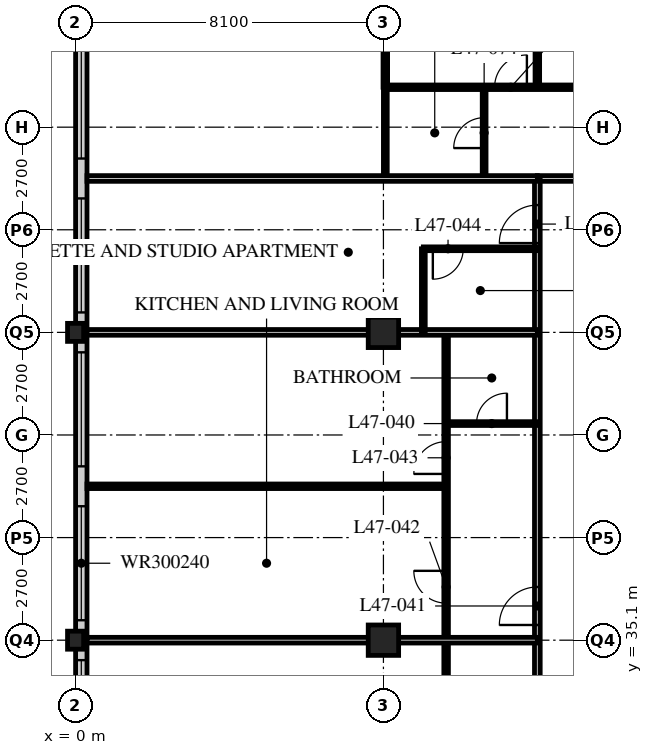
"""IFC4 building model, lengths in metres.
Left out: names, types, materials, properties, quantities, classifications, styles, units other than length and angle.
Written with IfcOpenShell. Run it as: python <this file> out.ifc"""

import sys

from ifc_helpers import new_model, si_unit, direction, frame, frame_2d, origin, origin_2d, place, context, subcontext, project, spatial, rectangle, hollow_rectangle, i_section, extrude, element, fill, save


model = new_model("IFC4")
c1 = context("Model", 3, precision=1e-05, world=origin(), true_north=direction((0.0, 1.0)))
c2 = subcontext(c1, "Body", "Model", "MODEL_VIEW")
j1 = project(units=[si_unit("LENGTHUNIT", "METRE"), si_unit("PLANEANGLEUNIT", "RADIAN")], contexts=[c1])
p1 = place(None, origin())
s1 = spatial("IfcSite", under=j1, at=p1, CompositionType="ELEMENT")
p2 = place(p1, origin())
s2 = spatial("IfcBuilding", under=s1, at=p2, CompositionType="ELEMENT")
p3 = place(p2, frame((0.0, 0.0, 184.8)))
s3 = spatial("IfcBuildingStorey", under=s2, at=p3, CompositionType="ELEMENT", Elevation=184.8)
for number, where, z_axis, x_axis in (
    (1, (0.0, 35.1, 0.0), (0.0, 0.0, 1.0), (1.0, 0.0, 0.0)),
    (2, (0.0, 43.2, 0.0), (0.0, 0.0, 1.0), (1.0, 0.0, 0.0)),
):
    element("IfcColumn", number, at=place(p3, frame(where, z_axis=z_axis, x_axis=x_axis)), inside=s3, PredefinedType="COLUMN", context=c2, shape_type="SweptSolid", body=[
        extrude(i_section(OverallWidth=0.424, OverallDepth=0.475, WebThickness=0.048, FlangeThickness=0.077, FilletRadius=0.015, at=origin_2d()), origin(), (0.0, 0.0, 1.0), 3.6),
    ])
for number, where, z_axis, x_axis in (
    (3, (8.1, 35.1, 0.0), (0.0, 0.0, 1.0), (1.0, 0.0, 0.0)),
    (4, (8.1, 43.2, 0.0), (0.0, 0.0, 1.0), (1.0, 0.0, 0.0)),
):
    element("IfcColumn", number, at=place(p3, frame(where, z_axis=z_axis, x_axis=x_axis)), inside=s3, PredefinedType="COLUMN", context=c2, shape_type="SweptSolid", body=[
        extrude(hollow_rectangle(XDim=0.8, YDim=0.8, WallThickness=0.08, at=origin_2d()), origin(), (0.0, 0.0, 1.0), 3.6),
    ])
p4 = place(p3, frame((0.15, 51.0, 0.0), z_axis=(0.0, 0.0, 1.0), x_axis=(0.0, -1.0, 0.0)))
e5 = element("IfcWall", 5, at=p4, inside=s3, PredefinedType="SOLIDWALL", context=c2, shape_type="SweptSolid", body=[
    extrude(rectangle(XDim=32.1, YDim=0.3, at=frame_2d((16.05, 0.0))), origin(), (0.0, 0.0, 1.0), 3.39),
])
p5 = place(p4, frame((0.225, 0.0, 0.6)))
e6 = element("IfcOpeningElement", 6, at=p5, cuts=e5, PredefinedType="OPENING", context=c2, shape_type="SweptSolid", body=[
    extrude(rectangle(XDim=3.0, YDim=2.4, at=frame_2d((1.5, 1.2))), frame((0.0, 0.16, 0.0), z_axis=(0.0, -1.0, 0.0), x_axis=(1.0, 0.0, 0.0)), (0.0, 0.0, 1.0), 0.32),
])
p6 = place(p4, frame((4.275, 0.0, 0.6)))
e7 = element("IfcOpeningElement", 7, at=p6, cuts=e5, PredefinedType="OPENING", context=c2, shape_type="SweptSolid", body=[
    extrude(rectangle(XDim=3.0, YDim=2.4, at=frame_2d((1.5, 1.2))), frame((0.0, 0.16, 0.0), z_axis=(0.0, -1.0, 0.0), x_axis=(1.0, 0.0, 0.0)), (0.0, 0.0, 1.0), 0.32),
])
p7 = place(p4, frame((8.325, 0.0, 0.6)))
e8 = element("IfcOpeningElement", 8, at=p7, cuts=e5, PredefinedType="OPENING", context=c2, shape_type="SweptSolid", body=[
    extrude(rectangle(XDim=3.0, YDim=2.4, at=frame_2d((1.5, 1.2))), frame((0.0, 0.16, 0.0), z_axis=(0.0, -1.0, 0.0), x_axis=(1.0, 0.0, 0.0)), (0.0, 0.0, 1.0), 0.32),
])
p8 = place(p4, frame((12.375, 0.0, 0.6)))
e9 = element("IfcOpeningElement", 9, at=p8, cuts=e5, PredefinedType="OPENING", context=c2, shape_type="SweptSolid", body=[
    extrude(rectangle(XDim=3.0, YDim=2.4, at=frame_2d((1.5, 1.2))), frame((0.0, 0.16, 0.0), z_axis=(0.0, -1.0, 0.0), x_axis=(1.0, 0.0, 0.0)), (0.0, 0.0, 1.0), 0.32),
])
p9 = place(p4, frame((16.425, 0.0, 0.6)))
e10 = element("IfcOpeningElement", 10, at=p9, cuts=e5, PredefinedType="OPENING", context=c2, shape_type="SweptSolid", body=[
    extrude(rectangle(XDim=3.0, YDim=2.4, at=frame_2d((1.5, 1.2))), frame((0.0, 0.16, 0.0), z_axis=(0.0, -1.0, 0.0), x_axis=(1.0, 0.0, 0.0)), (0.0, 0.0, 1.0), 0.32),
])
p10 = place(p4, frame((20.475, 0.0, 0.6)))
e11 = element("IfcOpeningElement", 11, at=p10, cuts=e5, PredefinedType="OPENING", context=c2, shape_type="SweptSolid", body=[
    extrude(rectangle(XDim=3.0, YDim=2.4, at=frame_2d((1.5, 1.2))), frame((0.0, 0.16, 0.0), z_axis=(0.0, -1.0, 0.0), x_axis=(1.0, 0.0, 0.0)), (0.0, 0.0, 1.0), 0.32),
])
p11 = place(p4, frame((24.525, 0.0, 0.6)))
e12 = element("IfcOpeningElement", 12, at=p11, cuts=e5, PredefinedType="OPENING", context=c2, shape_type="SweptSolid", body=[
    extrude(rectangle(XDim=3.0, YDim=2.4, at=frame_2d((1.5, 1.2))), frame((0.0, 0.16, 0.0), z_axis=(0.0, -1.0, 0.0), x_axis=(1.0, 0.0, 0.0)), (0.0, 0.0, 1.0), 0.32),
])
p12 = place(p4, frame((28.575, 0.0, 0.6)))
e13 = element("IfcOpeningElement", 13, at=p12, cuts=e5, PredefinedType="OPENING", context=c2, shape_type="SweptSolid", body=[
    extrude(rectangle(XDim=3.0, YDim=2.4, at=frame_2d((1.5, 1.2))), frame((0.0, 0.16, 0.0), z_axis=(0.0, -1.0, 0.0), x_axis=(1.0, 0.0, 0.0)), (0.0, 0.0, 1.0), 0.32),
])
p13 = place(p3, frame((12.15, 47.25, 0.0), z_axis=(0.0, 0.0, 1.0), x_axis=(1.0, 0.0, 0.0)))
e14 = element("IfcWall", 14, at=p13, inside=s3, PredefinedType="PARTITIONING", context=c2, shape_type="SweptSolid", body=[
    extrude(rectangle(XDim=32.4, YDim=0.15, at=frame_2d((16.2, 0.0))), origin(), (0.0, 0.0, 1.0), 3.39),
])
p14 = place(p13, frame((4.45, 0.0, 0.0)))
e15 = element("IfcOpeningElement", 15, at=p14, cuts=e14, PredefinedType="OPENING", context=c2, shape_type="SweptSolid", body=[
    extrude(rectangle(XDim=1.0, YDim=2.1, at=frame_2d((0.5, 1.05))), frame((0.0, 0.085, 0.0), z_axis=(0.0, -1.0, 0.0), x_axis=(1.0, 0.0, 0.0)), (0.0, 0.0, 1.0), 0.17),
])
p15 = place(p13, frame((16.6, 0.0, 0.0)))
e16 = element("IfcOpeningElement", 16, at=p15, cuts=e14, PredefinedType="OPENING", context=c2, shape_type="SweptSolid", body=[
    extrude(rectangle(XDim=1.0, YDim=2.1, at=frame_2d((0.5, 1.05))), frame((0.0, 0.085, 0.0), z_axis=(0.0, -1.0, 0.0), x_axis=(1.0, 0.0, 0.0)), (0.0, 0.0, 1.0), 0.17),
])
p16 = place(p13, frame((29.875, 0.0, 0.0)))
e17 = element("IfcOpeningElement", 17, at=p16, cuts=e14, PredefinedType="OPENING", context=c2, shape_type="SweptSolid", body=[
    extrude(rectangle(XDim=1.0, YDim=2.1, at=frame_2d((0.5, 1.05))), frame((0.0, 0.085, 0.0), z_axis=(0.0, -1.0, 0.0), x_axis=(1.0, 0.0, 0.0)), (0.0, 0.0, 1.0), 0.17),
])
p17 = place(p13, frame((1.525, 0.0, 0.0)))
e18 = element("IfcOpeningElement", 18, at=p17, cuts=e14, PredefinedType="OPENING", context=c2, shape_type="SweptSolid", body=[
    extrude(rectangle(XDim=1.0, YDim=2.1, at=frame_2d((0.5, 1.05))), frame((0.0, 0.085, 0.0), z_axis=(0.0, -1.0, 0.0), x_axis=(1.0, 0.0, 0.0)), (0.0, 0.0, 1.0), 0.17),
])
p18 = place(p3, frame((12.15, 18.9, 0.0), z_axis=(0.0, 0.0, 1.0), x_axis=(0.0, 1.0, 0.0)))
e19 = element("IfcWall", 19, at=p18, inside=s3, PredefinedType="PARTITIONING", context=c2, shape_type="SweptSolid", body=[
    extrude(rectangle(XDim=28.35, YDim=0.15, at=frame_2d((14.175, 0.0))), origin(), (0.0, 0.0, 1.0), 3.39),
])
p19 = place(p18, frame((2.35, 0.0, 0.0)))
e20 = element("IfcOpeningElement", 20, at=p19, cuts=e19, PredefinedType="OPENING", context=c2, shape_type="SweptSolid", body=[
    extrude(rectangle(XDim=1.0, YDim=2.1, at=frame_2d((0.5, 1.05))), frame((0.0, 0.085, 0.0), z_axis=(0.0, -1.0, 0.0), x_axis=(1.0, 0.0, 0.0)), (0.0, 0.0, 1.0), 0.17),
])
p20 = place(p18, frame((6.4, 0.0, 0.0)))
e21 = element("IfcOpeningElement", 21, at=p20, cuts=e19, PredefinedType="OPENING", context=c2, shape_type="SweptSolid", body=[
    extrude(rectangle(XDim=1.0, YDim=2.1, at=frame_2d((0.5, 1.05))), frame((0.0, 0.085, 0.0), z_axis=(0.0, -1.0, 0.0), x_axis=(1.0, 0.0, 0.0)), (0.0, 0.0, 1.0), 0.17),
])
p21 = place(p18, frame((8.5, 0.0, 0.0)))
e22 = element("IfcOpeningElement", 22, at=p21, cuts=e19, PredefinedType="OPENING", context=c2, shape_type="SweptSolid", body=[
    extrude(rectangle(XDim=1.0, YDim=2.1, at=frame_2d((0.5, 1.05))), frame((0.0, 0.085, 0.0), z_axis=(0.0, -1.0, 0.0), x_axis=(1.0, 0.0, 0.0)), (0.0, 0.0, 1.0), 0.17),
])
p22 = place(p18, frame((16.6, 0.0, 0.0)))
e23 = element("IfcOpeningElement", 23, at=p22, cuts=e19, PredefinedType="OPENING", context=c2, shape_type="SweptSolid", body=[
    extrude(rectangle(XDim=1.0, YDim=2.1, at=frame_2d((0.5, 1.05))), frame((0.0, 0.085, 0.0), z_axis=(0.0, -1.0, 0.0), x_axis=(1.0, 0.0, 0.0)), (0.0, 0.0, 1.0), 0.17),
])
p23 = place(p18, frame((26.65, 0.0, 0.0)))
e24 = element("IfcOpeningElement", 24, at=p23, cuts=e19, PredefinedType="OPENING", context=c2, shape_type="SweptSolid", body=[
    extrude(rectangle(XDim=1.0, YDim=2.1, at=frame_2d((0.5, 1.05))), frame((0.0, 0.085, 0.0), z_axis=(0.0, -1.0, 0.0), x_axis=(1.0, 0.0, 0.0)), (0.0, 0.0, 1.0), 0.17),
])
p24 = place(p3, frame((9.75, 27.0, 0.0), z_axis=(0.0, 0.0, 1.0), x_axis=(0.0, 1.0, 0.0)))
e25 = element("IfcWall", 25, at=p24, inside=s3, PredefinedType="PARTITIONING", context=c2, shape_type="SweptSolid", body=[
    extrude(rectangle(XDim=16.2, YDim=0.12, at=frame_2d((8.1, 0.0))), origin(), (0.0, 0.0, 1.0), 3.39),
])
p25 = place(p24, frame((0.975, 0.0, 0.0)))
e26 = element("IfcOpeningElement", 26, at=p25, cuts=e25, PredefinedType="OPENING", context=c2, shape_type="SweptSolid", body=[
    extrude(rectangle(XDim=0.85, YDim=2.1, at=frame_2d((0.425, 1.05))), frame((0.0, 0.07, 0.0), z_axis=(0.0, -1.0, 0.0), x_axis=(1.0, 0.0, 0.0)), (0.0, 0.0, 1.0), 0.14),
])
p26 = place(p24, frame((4.375, 0.0, 0.0)))
e27 = element("IfcOpeningElement", 27, at=p26, cuts=e25, PredefinedType="OPENING", context=c2, shape_type="SweptSolid", body=[
    extrude(rectangle(XDim=0.85, YDim=2.1, at=frame_2d((0.425, 1.05))), frame((0.0, 0.07, 0.0), z_axis=(0.0, -1.0, 0.0), x_axis=(1.0, 0.0, 0.0)), (0.0, 0.0, 1.0), 0.14),
])
p27 = place(p24, frame((9.075, 0.0, 0.0)))
e28 = element("IfcOpeningElement", 28, at=p27, cuts=e25, PredefinedType="OPENING", context=c2, shape_type="SweptSolid", body=[
    extrude(rectangle(XDim=0.85, YDim=2.1, at=frame_2d((0.425, 1.05))), frame((0.0, 0.07, 0.0), z_axis=(0.0, -1.0, 0.0), x_axis=(1.0, 0.0, 0.0)), (0.0, 0.0, 1.0), 0.14),
])
p28 = place(p24, frame((12.475, 0.0, 0.0)))
e29 = element("IfcOpeningElement", 29, at=p28, cuts=e25, PredefinedType="OPENING", context=c2, shape_type="SweptSolid", body=[
    extrude(rectangle(XDim=0.85, YDim=2.1, at=frame_2d((0.425, 1.05))), frame((0.0, 0.07, 0.0), z_axis=(0.0, -1.0, 0.0), x_axis=(1.0, 0.0, 0.0)), (0.0, 0.0, 1.0), 0.14),
])
p29 = place(p3, frame((12.15, 35.1, 0.0), z_axis=(0.0, 0.0, 1.0), x_axis=(-1.0, 0.0, 0.0)))
e30 = element("IfcWall", 30, at=p29, inside=s3, PredefinedType="PARTITIONING", context=c2, shape_type="SweptSolid", body=[
    extrude(rectangle(XDim=11.85, YDim=0.15, at=frame_2d((5.925, 0.0))), origin(), (0.0, 0.0, 1.0), 2.778),
])
p30 = place(p3, frame((12.15, 40.8, 0.0), z_axis=(0.0, 0.0, 1.0), x_axis=(-1.0, 0.0, 0.0)))
e31 = element("IfcWall", 31, at=p30, inside=s3, PredefinedType="PARTITIONING", context=c2, shape_type="SweptSolid", body=[
    extrude(rectangle(XDim=2.4, YDim=0.1, at=frame_2d((1.2, 0.0))), origin(), (0.0, 0.0, 1.0), 3.39),
])
p31 = place(p30, frame((0.8, 0.0, 0.0)))
e32 = element("IfcOpeningElement", 32, at=p31, cuts=e31, PredefinedType="OPENING", context=c2, shape_type="SweptSolid", body=[
    extrude(rectangle(XDim=0.8, YDim=2.1, at=frame_2d((0.4, 1.05))), frame((0.0, 0.06, 0.0), z_axis=(0.0, -1.0, 0.0), x_axis=(1.0, 0.0, 0.0)), (0.0, 0.0, 1.0), 0.12),
])
p32 = place(p3, frame((9.75, 39.15, 0.0), z_axis=(0.0, 0.0, 1.0), x_axis=(-1.0, 0.0, 0.0)))
e33 = element("IfcWall", 33, at=p32, inside=s3, PredefinedType="PARTITIONING", context=c2, shape_type="SweptSolid", body=[
    extrude(rectangle(XDim=9.45, YDim=0.12, at=frame_2d((4.725, 0.0))), origin(), (0.0, 0.0, 1.0), 3.39),
])
p33 = place(p3, frame((12.15, 43.2, 0.0), z_axis=(0.0, 0.0, 1.0), x_axis=(-1.0, 0.0, 0.0)))
e34 = element("IfcWall", 34, at=p33, inside=s3, PredefinedType="PARTITIONING", context=c2, shape_type="SweptSolid", body=[
    extrude(rectangle(XDim=11.85, YDim=0.15, at=frame_2d((5.925, 0.0))), origin(), (0.0, 0.0, 1.0), 2.778),
])
p34 = place(p3, frame((9.15, 43.2, 0.0), z_axis=(0.0, 0.0, 1.0), x_axis=(0.0, 1.0, 0.0)))
e35 = element("IfcWall", 35, at=p34, inside=s3, PredefinedType="PARTITIONING", context=c2, shape_type="SweptSolid", body=[
    extrude(rectangle(XDim=2.2, YDim=0.1, at=frame_2d((1.1, 0.0))), origin(), (0.0, 0.0, 1.0), 3.39),
])
p35 = place(p3, frame((12.15, 45.4, 0.0), z_axis=(0.0, 0.0, 1.0), x_axis=(-1.0, 0.0, 0.0)))
e36 = element("IfcWall", 36, at=p35, inside=s3, PredefinedType="PARTITIONING", context=c2, shape_type="SweptSolid", body=[
    extrude(rectangle(XDim=3.0, YDim=0.1, at=frame_2d((1.5, 0.0))), origin(), (0.0, 0.0, 1.0), 3.39),
])
p36 = place(p35, frame((1.95, 0.0, 0.0)))
e37 = element("IfcOpeningElement", 37, at=p36, cuts=e36, PredefinedType="OPENING", context=c2, shape_type="SweptSolid", body=[
    extrude(rectangle(XDim=0.8, YDim=2.1, at=frame_2d((0.4, 1.05))), frame((0.0, 0.06, 0.0), z_axis=(0.0, -1.0, 0.0), x_axis=(1.0, 0.0, 0.0)), (0.0, 0.0, 1.0), 0.12),
])
p37 = place(p3, frame((10.75, 47.25, 0.0), z_axis=(0.0, 0.0, 1.0), x_axis=(0.0, 1.0, 0.0)))
e38 = element("IfcWall", 38, at=p37, inside=s3, PredefinedType="PARTITIONING", context=c2, shape_type="SweptSolid", body=[
    extrude(rectangle(XDim=2.4, YDim=0.1, at=frame_2d((1.2, 0.0))), origin(), (0.0, 0.0, 1.0), 3.39),
])
p38 = place(p37, frame((0.8, 0.0, 0.0)))
e39 = element("IfcOpeningElement", 39, at=p38, cuts=e38, PredefinedType="OPENING", context=c2, shape_type="SweptSolid", body=[
    extrude(rectangle(XDim=0.8, YDim=2.1, at=frame_2d((0.4, 1.05))), frame((0.0, 0.06, 0.0), z_axis=(0.0, -1.0, 0.0), x_axis=(1.0, 0.0, 0.0)), (0.0, 0.0, 1.0), 0.12),
])
p39 = place(p3, frame((8.15, 47.25, 0.0), z_axis=(0.0, 0.0, 1.0), x_axis=(0.0, 1.0, 0.0)))
e40 = element("IfcWall", 40, at=p39, inside=s3, PredefinedType="PARTITIONING", context=c2, shape_type="SweptSolid", body=[
    extrude(rectangle(XDim=2.4, YDim=0.1, at=frame_2d((1.2, 0.0))), origin(), (0.0, 0.0, 1.0), 2.778),
])
p40 = place(p3, frame((8.15, 49.65, 0.0), z_axis=(0.0, 0.0, 1.0), x_axis=(1.0, 0.0, 0.0)))
e41 = element("IfcWall", 41, at=p40, inside=s3, PredefinedType="PARTITIONING", context=c2, shape_type="SweptSolid", body=[
    extrude(rectangle(XDim=40.4, YDim=0.12, at=frame_2d((20.2, 0.0))), origin(), (0.0, 0.0, 1.0), 3.39),
])
p41 = place(p40, frame((9.025, 0.0, 0.0)))
e42 = element("IfcOpeningElement", 42, at=p41, cuts=e41, PredefinedType="OPENING", context=c2, shape_type="SweptSolid", body=[
    extrude(rectangle(XDim=0.85, YDim=2.1, at=frame_2d((0.425, 1.05))), frame((0.0, 0.07, 0.0), z_axis=(0.0, -1.0, 0.0), x_axis=(1.0, 0.0, 0.0)), (0.0, 0.0, 1.0), 0.14),
])
p42 = place(p40, frame((16.475, 0.0, 0.0)))
e43 = element("IfcOpeningElement", 43, at=p42, cuts=e41, PredefinedType="OPENING", context=c2, shape_type="SweptSolid", body=[
    extrude(rectangle(XDim=0.85, YDim=2.1, at=frame_2d((0.425, 1.05))), frame((0.0, 0.07, 0.0), z_axis=(0.0, -1.0, 0.0), x_axis=(1.0, 0.0, 0.0)), (0.0, 0.0, 1.0), 0.14),
])
p43 = place(p40, frame((21.175, 0.0, 0.0)))
e44 = element("IfcOpeningElement", 44, at=p43, cuts=e41, PredefinedType="OPENING", context=c2, shape_type="SweptSolid", body=[
    extrude(rectangle(XDim=0.85, YDim=2.1, at=frame_2d((0.425, 1.05))), frame((0.0, 0.07, 0.0), z_axis=(0.0, -1.0, 0.0), x_axis=(1.0, 0.0, 0.0)), (0.0, 0.0, 1.0), 0.14),
])
p44 = place(p40, frame((28.625, 0.0, 0.0)))
e45 = element("IfcOpeningElement", 45, at=p44, cuts=e41, PredefinedType="OPENING", context=c2, shape_type="SweptSolid", body=[
    extrude(rectangle(XDim=0.85, YDim=2.1, at=frame_2d((0.425, 1.05))), frame((0.0, 0.07, 0.0), z_axis=(0.0, -1.0, 0.0), x_axis=(1.0, 0.0, 0.0)), (0.0, 0.0, 1.0), 0.14),
])
p45 = place(p40, frame((32.825, 0.0, 0.0)))
e46 = element("IfcOpeningElement", 46, at=p45, cuts=e41, PredefinedType="OPENING", context=c2, shape_type="SweptSolid", body=[
    extrude(rectangle(XDim=0.85, YDim=2.1, at=frame_2d((0.425, 1.05))), frame((0.0, 0.07, 0.0), z_axis=(0.0, -1.0, 0.0), x_axis=(1.0, 0.0, 0.0)), (0.0, 0.0, 1.0), 0.14),
])
p46 = place(p40, frame((36.675, 0.0, 0.0)))
e47 = element("IfcOpeningElement", 47, at=p46, cuts=e41, PredefinedType="OPENING", context=c2, shape_type="SweptSolid", body=[
    extrude(rectangle(XDim=0.85, YDim=2.1, at=frame_2d((0.425, 1.05))), frame((0.0, 0.07, 0.0), z_axis=(0.0, -1.0, 0.0), x_axis=(1.0, 0.0, 0.0)), (0.0, 0.0, 1.0), 0.14),
])
p47 = place(p40, frame((6.725, 0.0, 0.0)))
e48 = element("IfcOpeningElement", 48, at=p47, cuts=e41, PredefinedType="OPENING", context=c2, shape_type="SweptSolid", body=[
    extrude(rectangle(XDim=0.85, YDim=2.1, at=frame_2d((0.425, 1.05))), frame((0.0, 0.07, 0.0), z_axis=(0.0, -1.0, 0.0), x_axis=(1.0, 0.0, 0.0)), (0.0, 0.0, 1.0), 0.14),
])
p48 = place(p40, frame((2.875, 0.0, 0.0)))
e49 = element("IfcOpeningElement", 49, at=p48, cuts=e41, PredefinedType="OPENING", context=c2, shape_type="SweptSolid", body=[
    extrude(rectangle(XDim=0.85, YDim=2.1, at=frame_2d((0.425, 1.05))), frame((0.0, 0.07, 0.0), z_axis=(0.0, -1.0, 0.0), x_axis=(1.0, 0.0, 0.0)), (0.0, 0.0, 1.0), 0.14),
])
p49 = place(p3, frame((12.15, 49.65, 0.0), z_axis=(0.0, 0.0, 1.0), x_axis=(0.0, 1.0, 0.0)))
e50 = element("IfcWall", 50, at=p49, inside=s3, PredefinedType="PARTITIONING", context=c2, shape_type="SweptSolid", body=[
    extrude(rectangle(XDim=9.45, YDim=0.12, at=frame_2d((4.725, 0.0))), origin(), (0.0, 0.0, 1.0), 3.39),
])
p50 = place(p3, frame((0.3, 47.25, 0.0), z_axis=(0.0, 0.0, 1.0), x_axis=(1.0, 0.0, 0.0)))
e51 = element("IfcWall", 51, at=p50, inside=s3, PredefinedType="PARTITIONING", context=c2, shape_type="SweptSolid", body=[
    extrude(rectangle(XDim=11.85, YDim=0.15, at=frame_2d((5.925, 0.0))), origin(), (0.0, 0.0, 1.0), 3.39),
])
p51 = place(p3, frame((8.15, 49.65, 0.0), z_axis=(0.0, 0.0, 1.0), x_axis=(0.0, 1.0, 0.0)))
e52 = element("IfcWall", 52, at=p51, inside=s3, PredefinedType="PARTITIONING", context=c2, shape_type="SweptSolid", body=[
    extrude(rectangle(XDim=1.25, YDim=0.12, at=frame_2d((0.625, 0.0))), origin(), (0.0, 0.0, 1.0), 2.778),
])
p52 = place(p5, origin())
e53 = element("IfcWindow", 53, at=p52, inside=s3, PartitioningType="SINGLE_PANEL", PredefinedType="WINDOW", context=c2, shape_type="SweptSolid", body=[
    extrude(rectangle(XDim=3.0, YDim=2.4, at=frame_2d((1.5, 1.2))), frame((0.0, 0.03, 0.0), z_axis=(0.0, -1.0, 0.0), x_axis=(1.0, 0.0, 0.0)), (0.0, 0.0, 1.0), 0.06),
])
fill(e6, e53)
p53 = place(p6, origin())
e54 = element("IfcWindow", 54, at=p53, inside=s3, PartitioningType="SINGLE_PANEL", PredefinedType="WINDOW", context=c2, shape_type="SweptSolid", body=[
    extrude(rectangle(XDim=3.0, YDim=2.4, at=frame_2d((1.5, 1.2))), frame((0.0, 0.03, 0.0), z_axis=(0.0, -1.0, 0.0), x_axis=(1.0, 0.0, 0.0)), (0.0, 0.0, 1.0), 0.06),
])
fill(e7, e54)
p54 = place(p7, origin())
e55 = element("IfcWindow", 55, at=p54, inside=s3, PartitioningType="SINGLE_PANEL", PredefinedType="WINDOW", context=c2, shape_type="SweptSolid", body=[
    extrude(rectangle(XDim=3.0, YDim=2.4, at=frame_2d((1.5, 1.2))), frame((0.0, 0.03, 0.0), z_axis=(0.0, -1.0, 0.0), x_axis=(1.0, 0.0, 0.0)), (0.0, 0.0, 1.0), 0.06),
])
fill(e8, e55)
p55 = place(p8, origin())
e56 = element("IfcWindow", 56, at=p55, inside=s3, PartitioningType="SINGLE_PANEL", PredefinedType="WINDOW", context=c2, shape_type="SweptSolid", body=[
    extrude(rectangle(XDim=3.0, YDim=2.4, at=frame_2d((1.5, 1.2))), frame((0.0, 0.03, 0.0), z_axis=(0.0, -1.0, 0.0), x_axis=(1.0, 0.0, 0.0)), (0.0, 0.0, 1.0), 0.06),
])
fill(e9, e56)
p56 = place(p9, origin())
e57 = element("IfcWindow", 57, at=p56, inside=s3, PartitioningType="SINGLE_PANEL", PredefinedType="WINDOW", context=c2, shape_type="SweptSolid", body=[
    extrude(rectangle(XDim=3.0, YDim=2.4, at=frame_2d((1.5, 1.2))), frame((0.0, 0.03, 0.0), z_axis=(0.0, -1.0, 0.0), x_axis=(1.0, 0.0, 0.0)), (0.0, 0.0, 1.0), 0.06),
])
fill(e10, e57)
p57 = place(p31, origin())
e58 = element("IfcDoor", 58, at=p57, inside=s3, OperationType="SINGLE_SWING_RIGHT", PredefinedType="DOOR", context=c2, shape_type="SweptSolid", body=[
    extrude(rectangle(XDim=0.8, YDim=2.1, at=frame_2d((0.4, 1.05))), frame((0.0, 0.025, 0.0), z_axis=(0.0, -1.0, 0.0), x_axis=(1.0, 0.0, 0.0)), (0.0, 0.0, 1.0), 0.05),
])
fill(e32, e58)
p58 = place(p22, origin())
e59 = element("IfcDoor", 59, at=p58, inside=s3, OperationType="SINGLE_SWING_LEFT", PredefinedType="DOOR", context=c2, shape_type="SweptSolid", body=[
    extrude(rectangle(XDim=1.0, YDim=2.1, at=frame_2d((0.5, 1.05))), frame((0.0, 0.025, 0.0), z_axis=(0.0, -1.0, 0.0), x_axis=(1.0, 0.0, 0.0)), (0.0, 0.0, 1.0), 0.05),
])
fill(e23, e59)
p59 = place(p27, origin())
e60 = element("IfcDoor", 60, at=p59, inside=s3, OperationType="SINGLE_SWING_RIGHT", PredefinedType="DOOR", context=c2, shape_type="SweptSolid", body=[
    extrude(rectangle(XDim=0.85, YDim=2.1, at=frame_2d((0.425, 1.05))), frame((0.0, 0.025, 0.0), z_axis=(0.0, -1.0, 0.0), x_axis=(1.0, 0.0, 0.0)), (0.0, 0.0, 1.0), 0.05),
])
fill(e28, e60)
p60 = place(p28, origin())
e61 = element("IfcDoor", 61, at=p60, inside=s3, OperationType="SINGLE_SWING_LEFT", PredefinedType="DOOR", context=c2, shape_type="SweptSolid", body=[
    extrude(rectangle(XDim=0.85, YDim=2.1, at=frame_2d((0.425, 1.05))), frame((0.0, 0.025, 0.0), z_axis=(0.0, -1.0, 0.0), x_axis=(1.0, 0.0, 0.0)), (0.0, 0.0, 1.0), 0.05),
])
fill(e29, e61)
p61 = place(p36, origin())
e62 = element("IfcDoor", 62, at=p61, inside=s3, OperationType="SINGLE_SWING_RIGHT", PredefinedType="DOOR", context=c2, shape_type="SweptSolid", body=[
    extrude(rectangle(XDim=0.8, YDim=2.1, at=frame_2d((0.4, 1.05))), frame((0.0, 0.025, 0.0), z_axis=(0.0, -1.0, 0.0), x_axis=(1.0, 0.0, 0.0)), (0.0, 0.0, 1.0), 0.05),
])
fill(e37, e62)
p62 = place(p23, origin())
e63 = element("IfcDoor", 63, at=p62, inside=s3, OperationType="SINGLE_SWING_LEFT", PredefinedType="DOOR", context=c2, shape_type="SweptSolid", body=[
    extrude(rectangle(XDim=1.0, YDim=2.1, at=frame_2d((0.5, 1.05))), frame((0.0, 0.025, 0.0), z_axis=(0.0, -1.0, 0.0), x_axis=(1.0, 0.0, 0.0)), (0.0, 0.0, 1.0), 0.05),
])
fill(e24, e63)
p63 = place(p38, origin())
e64 = element("IfcDoor", 64, at=p63, inside=s3, OperationType="SINGLE_SWING_LEFT", PredefinedType="DOOR", context=c2, shape_type="SweptSolid", body=[
    extrude(rectangle(XDim=0.8, YDim=2.1, at=frame_2d((0.4, 1.05))), frame((0.0, 0.025, 0.0), z_axis=(0.0, -1.0, 0.0), x_axis=(1.0, 0.0, 0.0)), (0.0, 0.0, 1.0), 0.05),
])
fill(e39, e64)
p64 = place(p48, origin())
e65 = element("IfcDoor", 65, at=p64, inside=s3, OperationType="SINGLE_SWING_RIGHT", PredefinedType="DOOR", context=c2, shape_type="SweptSolid", body=[
    extrude(rectangle(XDim=0.85, YDim=2.1, at=frame_2d((0.425, 1.05))), frame((0.0, 0.025, 0.0), z_axis=(0.0, -1.0, 0.0), x_axis=(1.0, 0.0, 0.0)), (0.0, 0.0, 1.0), 0.05),
])
fill(e49, e65)
save(model, sys.argv[1])
